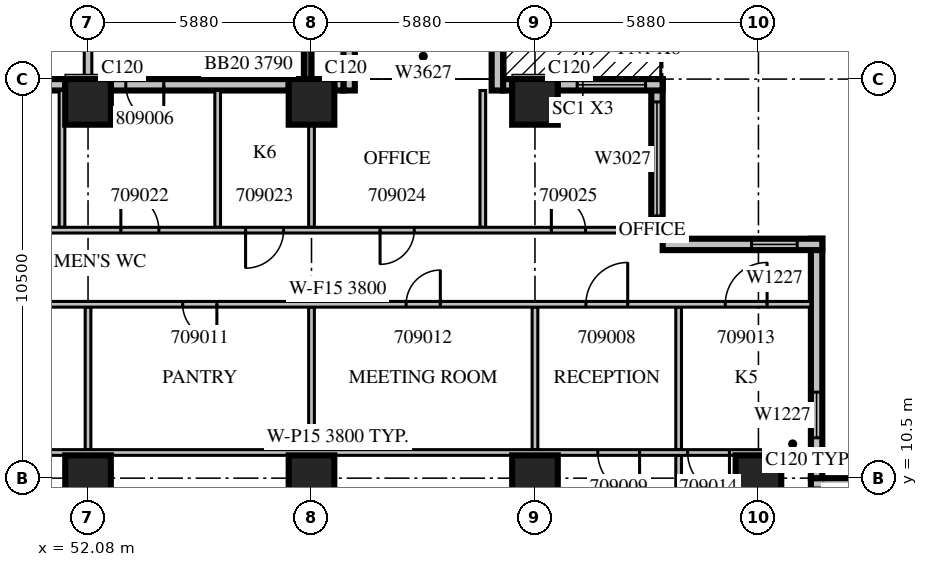
"""IFC4 building model, lengths in metres.
Left out: names, types, materials, properties, quantities, classifications, styles, units other than length and angle.
Written with IfcOpenShell. Run it as: python <this file> out.ifc"""

import sys

from ifc_helpers import new_model, si_unit, direction, frame, frame_2d, origin, origin_2d, place, context, subcontext, project, spatial, rectangle, extrude, source, transform, mapped, element, fill, save


model = new_model("IFC4")
c1 = context("Model", 3, precision=1e-05, world=origin(), true_north=direction((0.0, 1.0)))
c2 = subcontext(c1, "Body", "Model", "MODEL_VIEW")
j1 = project(units=[si_unit("LENGTHUNIT", "METRE"), si_unit("PLANEANGLEUNIT", "RADIAN")], contexts=[c1])
p1 = place(None, origin())
s1 = spatial("IfcSite", under=j1, at=p1, CompositionType="ELEMENT")
p2 = place(p1, origin())
s2 = spatial("IfcBuilding", under=s1, at=p2, CompositionType="ELEMENT")
p3 = place(p2, frame((0.0, 0.0, 48.9)))
s3 = spatial("IfcBuildingStorey", under=s2, at=p3, CompositionType="ELEMENT", Elevation=48.9)
m1 = source(origin(), c2, "Body", "SweptSolid", [
    extrude(rectangle(XDim=1.2, YDim=1.2, at=origin_2d()), origin(), (0.0, 0.0, 1.0), 4.2),
])
for number, where, z_axis, x_axis in (
    (1, (52.08, 10.5, 0.0), (0.0, 0.0, 1.0), (1.0, 0.0, 0.0)),
    (2, (57.96, 10.5, 0.0), (0.0, 0.0, 1.0), (1.0, 0.0, 0.0)),
    (3, (63.84, 10.5, 0.0), (0.0, 0.0, 1.0), (1.0, 0.0, 0.0)),
    (4, (69.72, 10.5, 0.0), (0.0, 0.0, 1.0), (1.0, 0.0, 0.0)),
    (5, (52.08, 20.4, 0.0), (0.0, 0.0, 1.0), (1.0, 0.0, 0.0)),
    (6, (57.96, 20.4, 0.0), (0.0, 0.0, 1.0), (1.0, 0.0, 0.0)),
    (7, (63.84, 20.4, 0.0), (0.0, 0.0, 1.0), (1.0, 0.0, 0.0)),
):
    element("IfcColumn", number, at=place(p3, frame(where, z_axis=z_axis, x_axis=x_axis)), inside=s3, PredefinedType="COLUMN", context=c2, shape_type="MappedRepresentation", body=[
        mapped(m1, transform((0.0, 0.0, 0.0), scale=1.0)),
    ])
m2 = source(origin(), c2, "Body", "SweptSolid", [
    extrude(rectangle(XDim=1.2, YDim=0.3, at=frame_2d((0.6, 0.0))), origin(), (0.0, 0.0, 1.0), 3.8),
])
p4 = place(p3, frame((71.1, 10.35, 0.0), z_axis=(0.0, 0.0, 1.0), x_axis=(1.0, 0.0, 0.0)))
e8 = element("IfcWall", 8, at=p4, inside=s3, PredefinedType="STANDARD", context=c2, shape_type="MappedRepresentation", body=[
    mapped(m2, transform((0.0, 0.0, 0.0), scale=1.0)),
])
m3 = source(origin(), c2, "Body", "SweptSolid", [
    extrude(rectangle(XDim=6.3, YDim=0.3, at=frame_2d((3.15, 0.0))), origin(), (0.0, 0.0, 1.0), 3.8),
])
p5 = place(p3, frame((71.25, 10.5, 0.0), z_axis=(0.0, 0.0, 1.0), x_axis=(0.0, 1.0, 0.0)))
e9 = element("IfcWall", 9, at=p5, inside=s3, PredefinedType="STANDARD", context=c2, shape_type="MappedRepresentation", body=[
    mapped(m3, transform((0.0, 0.0, 0.0), scale=1.0)),
])
m4 = source(origin(), c2, "Body", "SweptSolid", [
    extrude(rectangle(XDim=1.2, YDim=2.7, at=frame_2d((0.6, 1.35))), frame((0.0, 0.16, 0.0), z_axis=(0.0, -1.0, 0.0), x_axis=(1.0, 0.0, 0.0)), (0.0, 0.0, 1.0), 0.32),
])
p6 = place(p5, frame((1.062, 0.0, 0.6)))
e10 = element("IfcOpeningElement", 10, at=p6, cuts=e9, PredefinedType="OPENING", context=c2, shape_type="MappedRepresentation", body=[
    mapped(m4, transform((0.0, 0.0, 0.0), scale=1.0)),
])
m5 = source(origin(), c2, "Body", "SweptSolid", [
    extrude(rectangle(XDim=4.2, YDim=0.3, at=frame_2d((2.1, 0.0))), origin(), (0.0, 0.0, 1.0), 3.8),
])
p7 = place(p3, frame((71.4, 16.65, 0.0), z_axis=(0.0, 0.0, 1.0), x_axis=(-1.0, 0.0, 0.0)))
e11 = element("IfcWall", 11, at=p7, inside=s3, PredefinedType="STANDARD", context=c2, shape_type="MappedRepresentation", body=[
    mapped(m5, transform((0.0, 0.0, 0.0), scale=1.0)),
])
p8 = place(p7, frame((0.66, 0.0, 0.6)))
e12 = element("IfcOpeningElement", 12, at=p8, cuts=e11, PredefinedType="OPENING", context=c2, shape_type="MappedRepresentation", body=[
    mapped(m4, transform((0.0, 0.0, 0.0), scale=1.0)),
])
p9 = place(p3, frame((67.05, 16.8, 0.0), z_axis=(0.0, 0.0, 1.0), x_axis=(0.0, 1.0, 0.0)))
e13 = element("IfcWall", 13, at=p9, inside=s3, PredefinedType="STANDARD", context=c2, shape_type="MappedRepresentation", body=[
    mapped(m5, transform((0.0, 0.0, 0.0), scale=1.0)),
])
m6 = source(origin(), c2, "Body", "SweptSolid", [
    extrude(rectangle(XDim=3.0, YDim=2.7, at=frame_2d((1.5, 1.35))), frame((0.0, 0.16, 0.0), z_axis=(0.0, -1.0, 0.0), x_axis=(1.0, 0.0, 0.0)), (0.0, 0.0, 1.0), 0.32),
])
p10 = place(p9, frame((0.6, 0.0, 0.6)))
e14 = element("IfcOpeningElement", 14, at=p10, cuts=e13, PredefinedType="OPENING", context=c2, shape_type="MappedRepresentation", body=[
    mapped(m6, transform((0.0, 0.0, 0.0), scale=1.0)),
])
m7 = source(origin(), c2, "Body", "SweptSolid", [
    extrude(rectangle(XDim=2.76, YDim=0.3, at=frame_2d((1.38, 0.0))), origin(), (0.0, 0.0, 1.0), 3.8),
])
p11 = place(p3, frame((67.2, 20.85, 0.0), z_axis=(0.0, 0.0, 1.0), x_axis=(-1.0, 0.0, 0.0)))
e15 = element("IfcWall", 15, at=p11, inside=s3, PredefinedType="STANDARD", context=c2, shape_type="MappedRepresentation", body=[
    mapped(m7, transform((0.0, 0.0, 0.0), scale=1.0)),
])
m8 = source(origin(), c2, "Body", "SweptSolid", [
    extrude(rectangle(XDim=1.8, YDim=2.4, at=frame_2d((0.9, 1.2))), frame((0.0, 0.16, 0.0), z_axis=(0.0, -1.0, 0.0), x_axis=(1.0, 0.0, 0.0)), (0.0, 0.0, 1.0), 0.32),
])
p12 = place(p11, frame((0.45, 0.0, 0.0)))
e16 = element("IfcOpeningElement", 16, at=p12, cuts=e15, PredefinedType="OPENING", context=c2, shape_type="MappedRepresentation", body=[
    mapped(m8, transform((0.0, 0.0, 0.0), scale=1.0)),
])
m9 = source(origin(), c2, "Body", "SweptSolid", [
    extrude(rectangle(XDim=0.24, YDim=0.3, at=frame_2d((0.12, 0.0))), origin(), (0.0, 0.0, 1.0), 3.8),
])
p13 = place(p3, frame((63.24, 20.85, 0.0), z_axis=(0.0, 0.0, 1.0), x_axis=(-1.0, 0.0, 0.0)))
e17 = element("IfcWall", 17, at=p13, inside=s3, PredefinedType="STANDARD", context=c2, shape_type="MappedRepresentation", body=[
    mapped(m9, transform((0.0, 0.0, 0.0), scale=1.0)),
])
for number, where, z_axis, x_axis in (
    (18, (62.85, 20.7, 0.0), (0.0, 0.0, 1.0), (0.0, 1.0, 0.0)),
    (19, (58.95, 20.7, 0.0), (0.0, 0.0, 1.0), (0.0, 1.0, 0.0)),
):
    element("IfcWall", number, at=place(p3, frame(where, z_axis=z_axis, x_axis=x_axis)), inside=s3, PredefinedType="STANDARD", context=c2, shape_type="MappedRepresentation", body=[
        mapped(m2, transform((0.0, 0.0, 0.0), scale=1.0)),
    ])
p14 = place(p3, frame((58.8, 20.85, 0.0), z_axis=(0.0, 0.0, 1.0), x_axis=(-1.0, 0.0, 0.0)))
e20 = element("IfcWall", 20, at=p14, inside=s3, PredefinedType="STANDARD", context=c2, shape_type="MappedRepresentation", body=[
    mapped(m9, transform((0.0, 0.0, 0.0), scale=1.0)),
])
m10 = source(origin(), c2, "Body", "SweptSolid", [
    extrude(rectangle(XDim=4.68, YDim=0.3, at=frame_2d((2.34, 0.0))), origin(), (0.0, 0.0, 1.0), 3.8),
])
p15 = place(p3, frame((57.36, 20.85, 0.0), z_axis=(0.0, 0.0, 1.0), x_axis=(-1.0, 0.0, 0.0)))
e21 = element("IfcWall", 21, at=p15, inside=s3, PredefinedType="STANDARD", context=c2, shape_type="MappedRepresentation", body=[
    mapped(m10, transform((0.0, 0.0, 0.0), scale=1.0)),
])
m11 = source(origin(), c2, "Body", "SweptSolid", [
    extrude(rectangle(XDim=1.0, YDim=2.1, at=frame_2d((0.5, 1.05))), frame((0.0, 0.16, 0.0), z_axis=(0.0, -1.0, 0.0), x_axis=(1.0, 0.0, 0.0)), (0.0, 0.0, 1.0), 0.32),
])
p16 = place(p15, frame((3.287, 0.0, 0.0)))
e22 = element("IfcOpeningElement", 22, at=p16, cuts=e21, PredefinedType="OPENING", context=c2, shape_type="MappedRepresentation", body=[
    mapped(m11, transform((0.0, 0.0, 0.0), scale=1.0)),
])
p17 = place(p3, frame((51.48, 20.85, 0.0), z_axis=(0.0, 0.0, 1.0), x_axis=(-1.0, 0.0, 0.0)))
e23 = element("IfcWall", 23, at=p17, inside=s3, PredefinedType="STANDARD", context=c2, shape_type="MappedRepresentation", body=[
    mapped(m10, transform((0.0, 0.0, 0.0), scale=1.0)),
])
p18 = place(p17, frame((1.887, 0.0, 0.0)))
e24 = element("IfcOpeningElement", 24, at=p18, cuts=e23, PredefinedType="OPENING", context=c2, shape_type="MappedRepresentation", body=[
    mapped(m11, transform((0.0, 0.0, 0.0), scale=1.0)),
])
p19 = place(p3, frame((52.08, 21.0, 0.0), z_axis=(0.0, 0.0, 1.0), x_axis=(0.0, 1.0, 0.0)))
e25 = element("IfcWall", 25, at=p19, inside=s3, PredefinedType="SOLIDWALL", context=c2, shape_type="SweptSolid", body=[
    extrude(rectangle(XDim=3.9, YDim=0.2, at=frame_2d((1.95, 0.0))), origin(), (0.0, 0.0, 1.0), 3.79),
])
m12 = source(origin(), c2, "Body", "SweptSolid", [
    extrude(rectangle(XDim=3.9, YDim=0.2, at=frame_2d((1.95, 0.0))), origin(), (0.0, 0.0, 1.0), 3.79),
])
p20 = place(p3, frame((57.86, 21.0, 0.0), z_axis=(0.0, 0.0, 1.0), x_axis=(0.0, 1.0, 0.0)))
e26 = element("IfcWall", 26, at=p20, inside=s3, PredefinedType="SOLIDWALL", context=c2, shape_type="MappedRepresentation", body=[
    mapped(m12, transform((0.0, 0.0, 0.0), scale=1.0)),
])
m13 = source(origin(), c2, "Body", "SweptSolid", [
    extrude(rectangle(XDim=2.4, YDim=2.7, at=frame_2d((1.2, 1.35))), frame((0.0, 0.11, 0.0), z_axis=(0.0, -1.0, 0.0), x_axis=(1.0, 0.0, 0.0)), (0.0, 0.0, 1.0), 0.22),
])
p21 = place(p20, frame((0.75, 0.0, 0.6)))
e27 = element("IfcOpeningElement", 27, at=p21, cuts=e26, PredefinedType="OPENING", context=c2, shape_type="MappedRepresentation", body=[
    mapped(m13, transform((0.0, 0.0, 0.0), scale=1.0)),
])
m14 = source(origin(), c2, "Body", "SweptSolid", [
    extrude(rectangle(XDim=3.75, YDim=0.15, at=frame_2d((1.875, 0.0))), origin(), (0.0, 0.0, 1.0), 3.8),
])
for number, where, z_axis, x_axis in (
    (28, (52.08, 11.25, 0.0), (0.0, 0.0, 1.0), (0.0, 1.0, 0.0)),
    (29, (57.96, 11.25, 0.0), (0.0, 0.0, 1.0), (0.0, 1.0, 0.0)),
    (30, (63.84, 11.25, 0.0), (0.0, 0.0, 1.0), (0.0, 1.0, 0.0)),
):
    element("IfcWall", number, at=place(p3, frame(where, z_axis=z_axis, x_axis=x_axis)), inside=s3, PredefinedType="PARTITIONING", context=c2, shape_type="MappedRepresentation", body=[
        mapped(m14, transform((0.0, 0.0, 0.0), scale=1.0)),
    ])
m15 = source(origin(), c2, "Body", "SweptSolid", [
    extrude(rectangle(XDim=6.695, YDim=0.15, at=frame_2d((3.348, 0.0))), origin(), (0.0, 0.0, 1.0), 3.8),
])
p22 = place(p3, frame((67.62, 4.405, 0.0), z_axis=(0.0, 0.0, 1.0), x_axis=(0.0, 1.0, 0.0)))
e31 = element("IfcWall", 31, at=p22, inside=s3, PredefinedType="PARTITIONING", context=c2, shape_type="MappedRepresentation", body=[
    mapped(m15, transform((0.0, 0.0, 0.0), scale=1.0)),
])
p23 = place(p3, frame((67.62, 11.25, 0.0), z_axis=(0.0, 0.0, 1.0), x_axis=(0.0, 1.0, 0.0)))
e32 = element("IfcWall", 32, at=p23, inside=s3, PredefinedType="PARTITIONING", context=c2, shape_type="MappedRepresentation", body=[
    mapped(m14, transform((0.0, 0.0, 0.0), scale=1.0)),
])
m16 = source(origin(), c2, "Body", "SweptSolid", [
    extrude(rectangle(XDim=24.9, YDim=0.15, at=frame_2d((12.45, 0.0))), origin(), (0.0, 0.0, 1.0), 3.8),
])
p24 = place(p3, frame((71.1, 11.175, 0.0), z_axis=(0.0, 0.0, 1.0), x_axis=(-1.0, 0.0, 0.0)))
e33 = element("IfcWall", 33, at=p24, inside=s3, PredefinedType="PARTITIONING", context=c2, shape_type="MappedRepresentation", body=[
    mapped(m16, transform((0.0, 0.0, 0.0), scale=1.0)),
])
m17 = source(origin(), c2, "Body", "SweptSolid", [
    extrude(rectangle(XDim=1.1, YDim=2.1, at=frame_2d((0.55, 1.05))), frame((0.0, 0.085, 0.0), z_axis=(0.0, -1.0, 0.0), x_axis=(1.0, 0.0, 0.0)), (0.0, 0.0, 1.0), 0.17),
])
p25 = place(p24, frame((4.508, 0.0, 0.0)))
e34 = element("IfcOpeningElement", 34, at=p25, cuts=e33, PredefinedType="OPENING", context=c2, shape_type="MappedRepresentation", body=[
    mapped(m17, transform((0.0, 0.0, 0.0), scale=1.0)),
])
p26 = place(p24, frame((2.143, 0.0, 0.0)))
e35 = element("IfcOpeningElement", 35, at=p26, cuts=e33, PredefinedType="OPENING", context=c2, shape_type="MappedRepresentation", body=[
    mapped(m17, transform((0.0, 0.0, 0.0), scale=1.0)),
])
m18 = source(origin(), c2, "Body", "SweptSolid", [
    extrude(rectangle(XDim=3.6, YDim=0.15, at=frame_2d((1.8, 0.0))), origin(), (0.0, 0.0, 1.0), 3.8),
])
for number, where, z_axis, x_axis in (
    (36, (51.395, 20.7, 0.0), (0.0, 0.0, 1.0), (0.0, -1.0, 0.0)),
    (37, (55.491, 20.7, 0.0), (0.0, 0.0, 1.0), (0.0, -1.0, 0.0)),
    (38, (62.468, 20.7, 0.0), (0.0, 0.0, 1.0), (0.0, -1.0, 0.0)),
):
    element("IfcWall", number, at=place(p3, frame(where, z_axis=z_axis, x_axis=x_axis)), inside=s3, PredefinedType="PARTITIONING", context=c2, shape_type="MappedRepresentation", body=[
        mapped(m18, transform((0.0, 0.0, 0.0), scale=1.0)),
    ])
m19 = source(origin(), c2, "Body", "SweptSolid", [
    extrude(rectangle(XDim=2.701, YDim=0.15, at=frame_2d((1.351, 0.0))), origin(), (0.0, 0.0, 1.0), 3.8),
])
p27 = place(p3, frame((57.96, 17.1, 0.0), z_axis=(0.0, 0.0, 1.0), x_axis=(0.0, 1.0, 0.0)))
e39 = element("IfcWall", 39, at=p27, inside=s3, PredefinedType="PARTITIONING", context=c2, shape_type="MappedRepresentation", body=[
    mapped(m19, transform((0.0, 0.0, 0.0), scale=1.0)),
])
p28 = place(p3, frame((71.1, 15.075, 0.0), z_axis=(0.0, 0.0, 1.0), x_axis=(-1.0, 0.0, 0.0)))
e40 = element("IfcWall", 40, at=p28, inside=s3, PredefinedType="PARTITIONING", context=c2, shape_type="MappedRepresentation", body=[
    mapped(m16, transform((0.0, 0.0, 0.0), scale=1.0)),
])
p29 = place(p28, frame((4.82, 0.0, 0.0)))
e41 = element("IfcOpeningElement", 41, at=p29, cuts=e40, PredefinedType="OPENING", context=c2, shape_type="MappedRepresentation", body=[
    mapped(m17, transform((0.0, 0.0, 0.0), scale=1.0)),
])
m20 = source(origin(), c2, "Body", "SweptSolid", [
    extrude(rectangle(XDim=0.9, YDim=2.1, at=frame_2d((0.45, 1.05))), frame((0.0, 0.085, 0.0), z_axis=(0.0, -1.0, 0.0), x_axis=(1.0, 0.0, 0.0)), (0.0, 0.0, 1.0), 0.17),
])
p30 = place(p28, frame((21.51, 0.0, 0.0)))
e42 = element("IfcOpeningElement", 42, at=p30, cuts=e40, PredefinedType="OPENING", context=c2, shape_type="MappedRepresentation", body=[
    mapped(m20, transform((0.0, 0.0, 0.0), scale=1.0)),
])
p31 = place(p28, frame((15.63, 0.0, 0.0)))
e43 = element("IfcOpeningElement", 43, at=p31, cuts=e40, PredefinedType="OPENING", context=c2, shape_type="MappedRepresentation", body=[
    mapped(m20, transform((0.0, 0.0, 0.0), scale=1.0)),
])
p32 = place(p28, frame((9.75, 0.0, 0.0)))
e44 = element("IfcOpeningElement", 44, at=p32, cuts=e40, PredefinedType="OPENING", context=c2, shape_type="MappedRepresentation", body=[
    mapped(m20, transform((0.0, 0.0, 0.0), scale=1.0)),
])
p33 = place(p28, frame((1.153, 0.0, 0.0)))
e45 = element("IfcOpeningElement", 45, at=p33, cuts=e40, PredefinedType="OPENING", context=c2, shape_type="MappedRepresentation", body=[
    mapped(m17, transform((0.0, 0.0, 0.0), scale=1.0)),
])
m21 = source(origin(), c2, "Body", "SweptSolid", [
    extrude(rectangle(XDim=37.5, YDim=0.15, at=frame_2d((18.75, 0.0))), origin(), (0.0, 0.0, 1.0), 3.3),
])
p34 = place(p3, frame((29.4, 17.025, 0.0), z_axis=(0.0, 0.0, 1.0), x_axis=(1.0, 0.0, 0.0)))
e46 = element("IfcWall", 46, at=p34, inside=s3, PredefinedType="PARTITIONING", context=c2, shape_type="MappedRepresentation", body=[
    mapped(m21, transform((0.0, 0.0, 0.0), scale=1.0)),
])
m22 = source(origin(), c2, "Body", "SweptSolid", [
    extrude(rectangle(XDim=1.0, YDim=2.1, at=frame_2d((0.5, 1.05))), frame((0.0, 0.085, 0.0), z_axis=(0.0, -1.0, 0.0), x_axis=(1.0, 0.0, 0.0)), (0.0, 0.0, 1.0), 0.17),
])
p35 = place(p34, frame((1.357, 0.0, 0.0)))
e47 = element("IfcOpeningElement", 47, at=p35, cuts=e46, PredefinedType="OPENING", context=c2, shape_type="MappedRepresentation", body=[
    mapped(m22, transform((0.0, 0.0, 0.0), scale=1.0)),
])
p36 = place(p34, frame((4.669, 0.0, 0.0)))
e48 = element("IfcOpeningElement", 48, at=p36, cuts=e46, PredefinedType="OPENING", context=c2, shape_type="MappedRepresentation", body=[
    mapped(m22, transform((0.0, 0.0, 0.0), scale=1.0)),
])
p37 = place(p34, frame((7.012, 0.0, 0.0)))
e49 = element("IfcOpeningElement", 49, at=p37, cuts=e46, PredefinedType="OPENING", context=c2, shape_type="MappedRepresentation", body=[
    mapped(m22, transform((0.0, 0.0, 0.0), scale=1.0)),
])
p38 = place(p34, frame((10.05, 0.0, 0.0)))
e50 = element("IfcOpeningElement", 50, at=p38, cuts=e46, PredefinedType="OPENING", context=c2, shape_type="MappedRepresentation", body=[
    mapped(m20, transform((0.0, 0.0, 0.0), scale=1.0)),
])
p39 = place(p34, frame((13.401, 0.0, 0.0)))
e51 = element("IfcOpeningElement", 51, at=p39, cuts=e46, PredefinedType="OPENING", context=c2, shape_type="MappedRepresentation", body=[
    mapped(m20, transform((0.0, 0.0, 0.0), scale=1.0)),
])
p40 = place(p34, frame((15.501, 0.0, 0.0)))
e52 = element("IfcOpeningElement", 52, at=p40, cuts=e46, PredefinedType="OPENING", context=c2, shape_type="MappedRepresentation", body=[
    mapped(m20, transform((0.0, 0.0, 0.0), scale=1.0)),
])
p41 = place(p34, frame((18.898, 0.0, 0.0)))
e53 = element("IfcOpeningElement", 53, at=p41, cuts=e46, PredefinedType="OPENING", context=c2, shape_type="MappedRepresentation", body=[
    mapped(m22, transform((0.0, 0.0, 0.0), scale=1.0)),
])
p42 = place(p34, frame((23.543, 0.0, 0.0)))
e54 = element("IfcOpeningElement", 54, at=p42, cuts=e46, PredefinedType="OPENING", context=c2, shape_type="MappedRepresentation", body=[
    mapped(m22, transform((0.0, 0.0, 0.0), scale=1.0)),
])
p43 = place(p34, frame((26.826, 0.0, 0.0)))
e55 = element("IfcOpeningElement", 55, at=p43, cuts=e46, PredefinedType="OPENING", context=c2, shape_type="MappedRepresentation", body=[
    mapped(m22, transform((0.0, 0.0, 0.0), scale=1.0)),
])
p44 = place(p34, frame((30.364, 0.0, 0.0)))
e56 = element("IfcOpeningElement", 56, at=p44, cuts=e46, PredefinedType="OPENING", context=c2, shape_type="MappedRepresentation", body=[
    mapped(m20, transform((0.0, 0.0, 0.0), scale=1.0)),
])
p45 = place(p34, frame((34.871, 0.0, 0.0)))
e57 = element("IfcOpeningElement", 57, at=p45, cuts=e46, PredefinedType="OPENING", context=c2, shape_type="MappedRepresentation", body=[
    mapped(m20, transform((0.0, 0.0, 0.0), scale=1.0)),
])
m23 = source(origin(), c2, "Body", "SweptSolid", [
    extrude(rectangle(XDim=1.2, YDim=2.7, at=frame_2d((0.6, 1.35))), frame((0.0, 0.03, 0.0), z_axis=(0.0, -1.0, 0.0), x_axis=(1.0, 0.0, 0.0)), (0.0, 0.0, 1.0), 0.06),
])
p46 = place(p6, origin())
e58 = element("IfcWindow", 58, at=p46, inside=s3, PartitioningType="SINGLE_PANEL", PredefinedType="WINDOW", context=c2, shape_type="MappedRepresentation", body=[
    mapped(m23, transform((0.0, 0.0, 0.0), scale=1.0)),
])
fill(e10, e58)
p47 = place(p8, origin())
e59 = element("IfcWindow", 59, at=p47, inside=s3, PartitioningType="SINGLE_PANEL", PredefinedType="WINDOW", context=c2, shape_type="MappedRepresentation", body=[
    mapped(m23, transform((0.0, 0.0, 0.0), scale=1.0)),
])
fill(e12, e59)
m24 = source(origin(), c2, "Body", "SweptSolid", [
    extrude(rectangle(XDim=3.0, YDim=2.7, at=frame_2d((1.5, 1.35))), frame((0.0, 0.03, 0.0), z_axis=(0.0, -1.0, 0.0), x_axis=(1.0, 0.0, 0.0)), (0.0, 0.0, 1.0), 0.06),
])
p48 = place(p10, origin())
e60 = element("IfcWindow", 60, at=p48, inside=s3, PartitioningType="SINGLE_PANEL", PredefinedType="WINDOW", context=c2, shape_type="MappedRepresentation", body=[
    mapped(m24, transform((0.0, 0.0, 0.0), scale=1.0)),
])
fill(e14, e60)
m25 = source(origin(), c2, "Body", "SweptSolid", [
    extrude(rectangle(XDim=1.8, YDim=2.4, at=frame_2d((0.9, 1.2))), frame((0.0, 0.025, 0.0), z_axis=(0.0, -1.0, 0.0), x_axis=(1.0, 0.0, 0.0)), (0.0, 0.0, 1.0), 0.05),
])
p49 = place(p12, origin())
e61 = element("IfcDoor", 61, at=p49, inside=s3, OperationType="SLIDING_TO_LEFT", PredefinedType="DOOR", context=c2, shape_type="MappedRepresentation", body=[
    mapped(m25, transform((0.0, 0.0, 0.0), scale=1.0)),
])
fill(e16, e61)
m26 = source(origin(), c2, "Body", "SweptSolid", [
    extrude(rectangle(XDim=1.1, YDim=2.1, at=frame_2d((0.55, 1.05))), frame((0.0, 0.025, 0.0), z_axis=(0.0, -1.0, 0.0), x_axis=(1.0, 0.0, 0.0)), (0.0, 0.0, 1.0), 0.05),
])
p50 = place(p29, origin())
e62 = element("IfcDoor", 62, at=p50, inside=s3, OperationType="SINGLE_SWING_RIGHT", PredefinedType="DOOR", context=c2, shape_type="MappedRepresentation", body=[
    mapped(m26, transform((0.0, 0.0, 0.0), scale=1.0)),
])
fill(e41, e62)
p51 = place(p25, origin())
e63 = element("IfcDoor", 63, at=p51, inside=s3, OperationType="SINGLE_SWING_LEFT", PredefinedType="DOOR", context=c2, shape_type="MappedRepresentation", body=[
    mapped(m26, transform((0.0, 0.0, 0.0), scale=1.0)),
])
fill(e34, e63)
m27 = source(origin(), c2, "Body", "SweptSolid", [
    extrude(rectangle(XDim=0.9, YDim=2.1, at=frame_2d((0.45, 1.05))), frame((0.0, 0.025, 0.0), z_axis=(0.0, -1.0, 0.0), x_axis=(1.0, 0.0, 0.0)), (0.0, 0.0, 1.0), 0.05),
])
p52 = place(p31, origin())
e64 = element("IfcDoor", 64, at=p52, inside=s3, OperationType="SINGLE_SWING_LEFT", PredefinedType="DOOR", context=c2, shape_type="MappedRepresentation", body=[
    mapped(m27, transform((0.0, 0.0, 0.0), scale=1.0)),
])
fill(e43, e64)
p53 = place(p32, origin())
e65 = element("IfcDoor", 65, at=p53, inside=s3, OperationType="SINGLE_SWING_RIGHT", PredefinedType="DOOR", context=c2, shape_type="MappedRepresentation", body=[
    mapped(m27, transform((0.0, 0.0, 0.0), scale=1.0)),
])
fill(e44, e65)
p54 = place(p33, origin())
e66 = element("IfcDoor", 66, at=p54, inside=s3, OperationType="SINGLE_SWING_RIGHT", PredefinedType="DOOR", context=c2, shape_type="MappedRepresentation", body=[
    mapped(m26, transform((0.0, 0.0, 0.0), scale=1.0)),
])
fill(e45, e66)
p55 = place(p26, origin())
e67 = element("IfcDoor", 67, at=p55, inside=s3, OperationType="SINGLE_SWING_LEFT", PredefinedType="DOOR", context=c2, shape_type="MappedRepresentation", body=[
    mapped(m26, transform((0.0, 0.0, 0.0), scale=1.0)),
])
fill(e35, e67)
m28 = source(origin(), c2, "Body", "SweptSolid", [
    extrude(rectangle(XDim=1.0, YDim=2.1, at=frame_2d((0.5, 1.05))), frame((0.0, 0.025, 0.0), z_axis=(0.0, -1.0, 0.0), x_axis=(1.0, 0.0, 0.0)), (0.0, 0.0, 1.0), 0.05),
])
p56 = place(p42, origin())
e68 = element("IfcDoor", 68, at=p56, inside=s3, OperationType="SINGLE_SWING_LEFT", PredefinedType="DOOR", context=c2, shape_type="MappedRepresentation", body=[
    mapped(m28, transform((0.0, 0.0, 0.0), scale=1.0)),
])
fill(e54, e68)
p57 = place(p43, origin())
e69 = element("IfcDoor", 69, at=p57, inside=s3, OperationType="SINGLE_SWING_RIGHT", PredefinedType="DOOR", context=c2, shape_type="MappedRepresentation", body=[
    mapped(m28, transform((0.0, 0.0, 0.0), scale=1.0)),
])
fill(e55, e69)
p58 = place(p44, origin())
e70 = element("IfcDoor", 70, at=p58, inside=s3, OperationType="SINGLE_SWING_RIGHT", PredefinedType="DOOR", context=c2, shape_type="MappedRepresentation", body=[
    mapped(m27, transform((0.0, 0.0, 0.0), scale=1.0)),
])
fill(e56, e70)
p59 = place(p45, origin())
e71 = element("IfcDoor", 71, at=p59, inside=s3, OperationType="SINGLE_SWING_LEFT", PredefinedType="DOOR", context=c2, shape_type="MappedRepresentation", body=[
    mapped(m27, transform((0.0, 0.0, 0.0), scale=1.0)),
])
fill(e57, e71)
p60 = place(p16, origin())
e72 = element("IfcDoor", 72, at=p60, inside=s3, OperationType="SINGLE_SWING_LEFT", PredefinedType="DOOR", context=c2, shape_type="MappedRepresentation", body=[
    mapped(m28, transform((0.0, 0.0, 0.0), scale=1.0)),
])
fill(e22, e72)
save(model, sys.argv[1])
